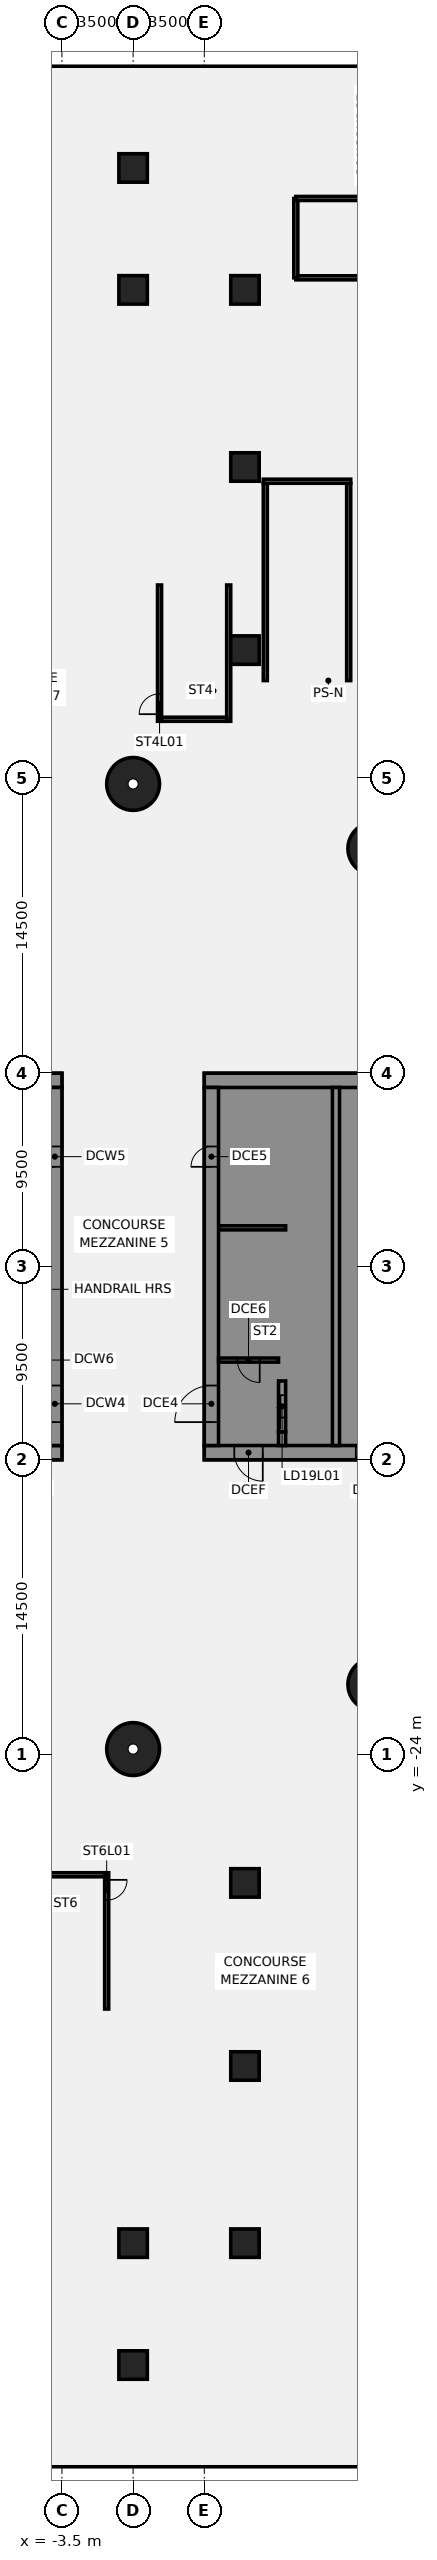
"""IFC4 building model, lengths in metres.
Left out: names, types, materials, properties, quantities, classifications, styles, units other than length and angle.
Written with IfcOpenShell. Run it as: python <this file> out.ifc"""

import sys

from ifc_helpers import new_model, si_unit, direction, frame, frame_2d, origin, origin_2d, place, context, subcontext, project, spatial, polyline, rectangle, circle, outline, extrude, element, fill, save


model = new_model("IFC4")
c1 = context("Model", 3, precision=1e-05, world=origin(), true_north=direction((0.0, 1.0)))
c2 = subcontext(c1, "Body", "Model", "MODEL_VIEW")
j1 = project(units=[si_unit("LENGTHUNIT", "METRE"), si_unit("PLANEANGLEUNIT", "RADIAN")], contexts=[c1])
p1 = place(None, origin())
s1 = spatial("IfcSite", under=j1, at=p1, CompositionType="ELEMENT")
p2 = place(p1, origin())
s2 = spatial("IfcBuilding", under=s1, at=p2, CompositionType="ELEMENT")
p3 = place(p2, frame((0.0, 0.0, 9.0)))
s3 = spatial("IfcBuildingStorey", under=s2, at=p3, CompositionType="ELEMENT", Elevation=9.0)
for number, where, z_axis, x_axis in (
    (1, (11.86, 20.543, -0.5), (0.0, 0.0, 1.0), (1.0, 0.0, 0.0)),
    (2, (0.0, 23.721, -0.5), (0.0, 0.0, 1.0), (1.0, 0.0, 0.0)),
    (3, (0.0, -23.721, -0.5), (0.0, 0.0, 1.0), (1.0, 0.0, 0.0)),
    (4, (11.86, -20.543, -0.5), (0.0, 0.0, 1.0), (1.0, 0.0, 0.0)),
):
    element("IfcColumn", number, at=place(p3, frame(where, z_axis=z_axis, x_axis=x_axis)), inside=s3, PredefinedType="COLUMN", context=c2, shape_type="SweptSolid", body=[
        extrude(circle(Radius=1.3, at=origin_2d()), origin(), (0.0, 0.0, 1.0), 6.0),
    ])
for number, where, z_axis, x_axis in (
    (5, (5.5, 39.3, -0.5), (0.0, 0.0, 1.0), (1.0, 0.0, 0.0)),
    (6, (5.5, 30.3, -0.5), (0.0, 0.0, 1.0), (1.0, 0.0, 0.0)),
    (7, (5.5, 48.008, -0.5), (0.0, 0.0, 1.0), (1.0, 0.0, 0.0)),
    (8, (0.0, 48.008, -0.5), (0.0, 0.0, 1.0), (1.0, 0.0, 0.0)),
    (9, (5.5, -39.3, -0.5), (0.0, 0.0, 1.0), (1.0, 0.0, 0.0)),
    (10, (5.5, -30.3, -0.5), (0.0, 0.0, 1.0), (1.0, 0.0, 0.0)),
    (11, (0.0, -48.008, -0.5), (0.0, 0.0, 1.0), (1.0, 0.0, 0.0)),
    (12, (5.5, -48.008, -0.5), (0.0, 0.0, 1.0), (1.0, 0.0, 0.0)),
    (13, (0.0, -54.0, -0.5), (0.0, 0.0, 1.0), (1.0, 0.0, 0.0)),
    (14, (0.0, 54.0, -0.5), (0.0, 0.0, 1.0), (1.0, 0.0, 0.0)),
):
    element("IfcColumn", number, at=place(p3, frame(where, z_axis=z_axis, x_axis=x_axis)), inside=s3, PredefinedType="COLUMN", context=c2, shape_type="SweptSolid", body=[
        extrude(rectangle(XDim=1.4, YDim=1.4, at=origin_2d()), origin(), (0.0, 0.0, 1.0), 6.0),
    ])
p4 = place(p3, frame((8.0, 48.6, 0.0), z_axis=(0.0, 0.0, 1.0), x_axis=(1.0, 0.0, 0.0)))
e15 = element("IfcWall", 15, at=p4, inside=s3, PredefinedType="PARTITIONING", context=c2, shape_type="SweptSolid", body=[
    extrude(rectangle(XDim=11.5, YDim=0.2, at=frame_2d((5.75, 0.0))), origin(), (0.0, 0.0, 1.0), 5.5),
])
p5 = place(p4, frame((9.78, 0.0, 0.0)))
e16 = element("IfcOpeningElement", 16, at=p5, cuts=e15, PredefinedType="OPENING", context=c2, shape_type="SweptSolid", body=[
    extrude(rectangle(XDim=1.2, YDim=2.1, at=frame_2d((0.6, 1.05))), frame((0.0, 0.11, 0.0), z_axis=(0.0, -1.0, 0.0), x_axis=(1.0, 0.0, 0.0)), (0.0, 0.0, 1.0), 0.22),
])
p6 = place(p3, frame((8.0, 48.6, 0.0), z_axis=(0.0, 0.0, 1.0), x_axis=(0.0, 1.0, 0.0)))
e17 = element("IfcWall", 17, at=p6, inside=s3, PredefinedType="PARTITIONING", context=c2, shape_type="SweptSolid", body=[
    extrude(rectangle(XDim=3.9, YDim=0.2, at=frame_2d((1.95, 0.0))), origin(), (0.0, 0.0, 1.0), 5.5),
])
p7 = place(p3, frame((8.0, 52.5, 0.0), z_axis=(0.0, 0.0, 1.0), x_axis=(1.0, 0.0, 0.0)))
e18 = element("IfcWall", 18, at=p7, inside=s3, PredefinedType="PARTITIONING", context=c2, shape_type="SweptSolid", body=[
    extrude(rectangle(XDim=11.5, YDim=0.2, at=frame_2d((5.75, 0.0))), origin(), (0.0, 0.0, 1.0), 5.5),
])
for number, where, z_axis, x_axis in (
    (19, (10.6, 28.8, 0.0), (0.0, 0.0, 1.0), (0.0, 1.0, 0.0)),
    (20, (6.5, 28.8, 0.0), (0.0, 0.0, 1.0), (0.0, 1.0, 0.0)),
):
    element("IfcWall", number, at=place(p3, frame(where, z_axis=z_axis, x_axis=x_axis)), inside=s3, PredefinedType="SOLIDWALL", context=c2, shape_type="SweptSolid", body=[
        extrude(rectangle(XDim=9.7, YDim=0.2, at=frame_2d((4.85, 0.0))), origin(), (0.0, 0.0, 1.0), 5.5),
    ])
p8 = place(p3, frame((10.7, 38.6, 0.0), z_axis=(0.0, 0.0, 1.0), x_axis=(-1.0, 0.0, 0.0)))
e21 = element("IfcWall", 21, at=p8, inside=s3, PredefinedType="SOLIDWALL", context=c2, shape_type="SweptSolid", body=[
    extrude(rectangle(XDim=4.3, YDim=0.2, at=frame_2d((2.15, 0.0))), origin(), (0.0, 0.0, 1.0), 5.5),
])
p9 = place(p3, frame((-16.5, -9.15, 0.0), z_axis=(0.0, 0.0, 1.0), x_axis=(1.0, 0.0, 0.0)))
e22 = element("IfcWall", 22, at=p9, inside=s3, PredefinedType="SHEAR", context=c2, shape_type="SweptSolid", body=[
    extrude(rectangle(XDim=13.0, YDim=0.7, at=frame_2d((6.5, 0.0))), origin(), (0.0, 0.0, 1.0), 5.5),
])
p10 = place(p9, frame((4.15, 0.0, 0.0)))
e23 = element("IfcOpeningElement", 23, at=p10, cuts=e22, PredefinedType="OPENING", context=c2, shape_type="SweptSolid", body=[
    extrude(rectangle(XDim=1.4, YDim=2.1, at=frame_2d((0.7, 1.05))), frame((0.0, 0.36, 0.0), z_axis=(0.0, -1.0, 0.0), x_axis=(1.0, 0.0, 0.0)), (0.0, 0.0, 1.0), 0.72),
])
p11 = place(p9, frame((10.125, 0.0, 0.0)))
e24 = element("IfcOpeningElement", 24, at=p11, cuts=e22, PredefinedType="OPENING", context=c2, shape_type="SweptSolid", body=[
    extrude(rectangle(XDim=1.4, YDim=2.1, at=frame_2d((0.7, 1.05))), frame((0.0, 0.36, 0.0), z_axis=(0.0, -1.0, 0.0), x_axis=(1.0, 0.0, 0.0)), (0.0, 0.0, 1.0), 0.72),
])
p12 = place(p3, frame((-16.5, 9.15, 0.0), z_axis=(0.0, 0.0, 1.0), x_axis=(1.0, 0.0, 0.0)))
e25 = element("IfcWall", 25, at=p12, inside=s3, PredefinedType="SHEAR", context=c2, shape_type="SweptSolid", body=[
    extrude(rectangle(XDim=13.0, YDim=0.7, at=frame_2d((6.5, 0.0))), origin(), (0.0, 0.0, 1.0), 5.5),
])
p13 = place(p3, frame((-3.85, -8.8, 0.0), z_axis=(0.0, 0.0, 1.0), x_axis=(0.0, 1.0, 0.0)))
e26 = element("IfcWall", 26, at=p13, inside=s3, PredefinedType="SHEAR", context=c2, shape_type="SweptSolid", body=[
    extrude(rectangle(XDim=17.6, YDim=0.7, at=frame_2d((8.8, 0.0))), origin(), (0.0, 0.0, 1.0), 5.5),
])
p14 = place(p13, frame((1.15, 0.0, 0.0)))
e27 = element("IfcOpeningElement", 27, at=p14, cuts=e26, PredefinedType="OPENING", context=c2, shape_type="SweptSolid", body=[
    extrude(rectangle(XDim=1.8, YDim=2.1, at=frame_2d((0.9, 1.05))), frame((0.0, 0.36, 0.0), z_axis=(0.0, -1.0, 0.0), x_axis=(1.0, 0.0, 0.0)), (0.0, 0.0, 1.0), 0.72),
])
p15 = place(p13, frame((13.7, 0.0, 0.0)))
e28 = element("IfcOpeningElement", 28, at=p15, cuts=e26, PredefinedType="OPENING", context=c2, shape_type="SweptSolid", body=[
    extrude(rectangle(XDim=1.0, YDim=2.1, at=frame_2d((0.5, 1.05))), frame((0.0, 0.36, 0.0), z_axis=(0.0, -1.0, 0.0), x_axis=(1.0, 0.0, 0.0)), (0.0, 0.0, 1.0), 0.72),
])
p16 = place(p3, frame((16.5, -9.15, 0.0), z_axis=(0.0, 0.0, 1.0), x_axis=(-1.0, 0.0, 0.0)))
e29 = element("IfcWall", 29, at=p16, inside=s3, PredefinedType="SHEAR", context=c2, shape_type="SweptSolid", body=[
    extrude(rectangle(XDim=13.0, YDim=0.7, at=frame_2d((6.5, 0.0))), origin(), (0.0, 0.0, 1.0), 5.5),
])
p17 = place(p16, frame((4.15, 0.0, 0.0)))
e30 = element("IfcOpeningElement", 30, at=p17, cuts=e29, PredefinedType="OPENING", context=c2, shape_type="SweptSolid", body=[
    extrude(rectangle(XDim=1.4, YDim=2.1, at=frame_2d((0.7, 1.05))), frame((0.0, 0.36, 0.0), z_axis=(0.0, -1.0, 0.0), x_axis=(1.0, 0.0, 0.0)), (0.0, 0.0, 1.0), 0.72),
])
p18 = place(p16, frame((10.125, 0.0, 0.0)))
e31 = element("IfcOpeningElement", 31, at=p18, cuts=e29, PredefinedType="OPENING", context=c2, shape_type="SweptSolid", body=[
    extrude(rectangle(XDim=1.4, YDim=2.1, at=frame_2d((0.7, 1.05))), frame((0.0, 0.36, 0.0), z_axis=(0.0, -1.0, 0.0), x_axis=(1.0, 0.0, 0.0)), (0.0, 0.0, 1.0), 0.72),
])
p19 = place(p3, frame((16.5, 9.15, 0.0), z_axis=(0.0, 0.0, 1.0), x_axis=(-1.0, 0.0, 0.0)))
e32 = element("IfcWall", 32, at=p19, inside=s3, PredefinedType="SHEAR", context=c2, shape_type="SweptSolid", body=[
    extrude(rectangle(XDim=13.0, YDim=0.7, at=frame_2d((6.5, 0.0))), origin(), (0.0, 0.0, 1.0), 5.5),
])
p20 = place(p3, origin())
e33 = element("IfcWall", 33, at=p20, inside=s3, PredefinedType="SHEAR", context=c2, shape_type="SweptSolid", body=[
    extrude(outline(polyline([(9.8, -5.375), (7.5, -5.375), (7.5, -2.875), (9.8, -2.875), (9.8, -2.625), (7.5, -2.625), (7.5, -0.125), (9.8, -0.125), (9.8, 0.125), (7.5, 0.125), (7.5, 2.625), (9.8, 2.625), (9.8, 2.875), (7.5, 2.875), (7.5, 5.375), (9.8, 5.375), (9.8, 5.625), (7.5, 5.625), (7.5, 8.125), (9.8, 8.125), (9.8, 8.8), (7.5, 8.8), (7.15, 8.8), (7.15, -5.625), (7.5, -5.625), (9.8, -5.625), (9.8, -5.375)])), origin(), (0.0, 0.0, 1.0), 5.5),
])
p21 = place(p3, origin())
e34 = element("IfcWall", 34, at=p21, inside=s3, PredefinedType="SHEAR", context=c2, shape_type="SweptSolid", body=[
    extrude(outline(polyline([(7.5, -8.125), (7.5, -8.8), (9.8, -8.8), (9.8, -8.125), (9.8, -5.625), (9.55, -5.625), (9.55, -8.125), (7.5, -8.125)])), origin(), (0.0, 0.0, 1.0), 5.5),
])
p22 = place(p3, frame((7.325, -8.8, 0.0), z_axis=(0.0, 0.0, 1.0), x_axis=(0.0, 1.0, 0.0)))
e35 = element("IfcWall", 35, at=p22, inside=s3, PredefinedType="SHEAR", context=c2, shape_type="SweptSolid", body=[
    extrude(rectangle(XDim=0.675, YDim=0.35, at=frame_2d((0.337, 0.0))), origin(), (0.0, 0.0, 1.0), 5.5),
])
p23 = place(p3, frame((7.5, 1.9, 0.0), z_axis=(0.0, 0.0, 1.0), x_axis=(-1.0, 0.0, 0.0)))
e36 = element("IfcWall", 36, at=p23, inside=s3, PredefinedType="SHEAR", context=c2, shape_type="SweptSolid", body=[
    extrude(rectangle(XDim=3.3, YDim=0.2, at=frame_2d((1.65, 0.0))), origin(), (0.0, 0.0, 1.0), 5.5),
])
p24 = place(p3, frame((9.975, -8.8, 0.0), z_axis=(0.0, 0.0, 1.0), x_axis=(0.0, 1.0, 0.0)))
e37 = element("IfcWall", 37, at=p24, inside=s3, PredefinedType="SHEAR", context=c2, shape_type="SweptSolid", body=[
    extrude(rectangle(XDim=17.6, YDim=0.35, at=frame_2d((8.8, 0.0))), origin(), (0.0, 0.0, 1.0), 5.5),
])
p25 = place(p3, frame((7.325, -8.125, 0.0), z_axis=(0.0, 0.0, 1.0), x_axis=(0.0, 1.0, 0.0)))
e38 = element("IfcWall", 38, at=p25, inside=s3, PredefinedType="SHEAR", context=c2, shape_type="SweptSolid", body=[
    extrude(rectangle(XDim=2.5, YDim=0.35, at=frame_2d((1.25, 0.0))), origin(), (0.0, 0.0, 1.0), 5.5),
])
p26 = place(p25, frame((0.7, 0.0, 0.0)))
e39 = element("IfcOpeningElement", 39, at=p26, cuts=e38, PredefinedType="OPENING", context=c2, shape_type="SweptSolid", body=[
    extrude(rectangle(XDim=1.1, YDim=2.1, at=frame_2d((0.55, 1.05))), frame((0.0, 0.185, 0.0), z_axis=(0.0, -1.0, 0.0), x_axis=(1.0, 0.0, 0.0)), (0.0, 0.0, 1.0), 0.37),
])
p27 = place(p3, frame((3.85, -8.8, 0.0), z_axis=(0.0, 0.0, 1.0), x_axis=(0.0, 1.0, 0.0)))
e40 = element("IfcWall", 40, at=p27, inside=s3, PredefinedType="SHEAR", context=c2, shape_type="SweptSolid", body=[
    extrude(rectangle(XDim=17.6, YDim=0.7, at=frame_2d((8.8, 0.0))), origin(), (0.0, 0.0, 1.0), 5.5),
])
p28 = place(p27, frame((1.15, 0.0, 0.0)))
e41 = element("IfcOpeningElement", 41, at=p28, cuts=e40, PredefinedType="OPENING", context=c2, shape_type="SweptSolid", body=[
    extrude(rectangle(XDim=1.8, YDim=2.1, at=frame_2d((0.9, 1.05))), frame((0.0, 0.36, 0.0), z_axis=(0.0, -1.0, 0.0), x_axis=(1.0, 0.0, 0.0)), (0.0, 0.0, 1.0), 0.72),
])
p29 = place(p27, frame((13.7, 0.0, 0.0)))
e42 = element("IfcOpeningElement", 42, at=p29, cuts=e40, PredefinedType="OPENING", context=c2, shape_type="SweptSolid", body=[
    extrude(rectangle(XDim=1.0, YDim=2.1, at=frame_2d((0.5, 1.05))), frame((0.0, 0.36, 0.0), z_axis=(0.0, -1.0, 0.0), x_axis=(1.0, 0.0, 0.0)), (0.0, 0.0, 1.0), 0.72),
])
p30 = place(p3, frame((7.15, -4.6, 0.0), z_axis=(0.0, 0.0, 1.0), x_axis=(-1.0, 0.0, 0.0)))
e43 = element("IfcWall", 43, at=p30, inside=s3, PredefinedType="SHEAR", context=c2, shape_type="SweptSolid", body=[
    extrude(rectangle(XDim=2.95, YDim=0.2, at=frame_2d((1.475, 0.0))), origin(), (0.0, 0.0, 1.0), 5.5),
])
p31 = place(p30, frame((0.925, 0.0, 0.0)))
e44 = element("IfcOpeningElement", 44, at=p31, cuts=e43, PredefinedType="OPENING", context=c2, shape_type="SweptSolid", body=[
    extrude(rectangle(XDim=1.1, YDim=2.1, at=frame_2d((0.55, 1.05))), frame((0.0, 0.11, 0.0), z_axis=(0.0, -1.0, 0.0), x_axis=(1.0, 0.0, 0.0)), (0.0, 0.0, 1.0), 0.22),
])
p32 = place(p3, frame((1.3, 26.8, 0.0), z_axis=(0.0, 0.0, 1.0), x_axis=(0.0, 1.0, 0.0)))
e45 = element("IfcWall", 45, at=p32, inside=s3, PredefinedType="SHEAR", context=c2, shape_type="SweptSolid", body=[
    extrude(rectangle(XDim=6.7, YDim=0.2, at=frame_2d((3.35, 0.0))), origin(), (0.0, 0.0, 1.0), 5.5),
])
p33 = place(p32, frame((0.35, 0.0, 0.0)))
e46 = element("IfcOpeningElement", 46, at=p33, cuts=e45, PredefinedType="OPENING", context=c2, shape_type="SweptSolid", body=[
    extrude(rectangle(XDim=1.0, YDim=2.1, at=frame_2d((0.5, 1.05))), frame((0.0, 0.11, 0.0), z_axis=(0.0, -1.0, 0.0), x_axis=(1.0, 0.0, 0.0)), (0.0, 0.0, 1.0), 0.22),
])
p34 = place(p3, frame((4.7, 26.8, 0.0), z_axis=(0.0, 0.0, 1.0), x_axis=(0.0, 1.0, 0.0)))
e47 = element("IfcWall", 47, at=p34, inside=s3, PredefinedType="SHEAR", context=c2, shape_type="SweptSolid", body=[
    extrude(rectangle(XDim=6.7, YDim=0.2, at=frame_2d((3.35, 0.0))), origin(), (0.0, 0.0, 1.0), 5.5),
])
p35 = place(p3, frame((4.6, 26.9, 0.0), z_axis=(0.0, 0.0, 1.0), x_axis=(-1.0, 0.0, 0.0)))
e48 = element("IfcWall", 48, at=p35, inside=s3, PredefinedType="SHEAR", context=c2, shape_type="SweptSolid", body=[
    extrude(rectangle(XDim=3.2, YDim=0.2, at=frame_2d((1.6, 0.0))), origin(), (0.0, 0.0, 1.0), 5.5),
])
p36 = place(p3, origin())
e49 = element("IfcWall", 49, at=p36, inside=s3, PredefinedType="SHEAR", context=c2, shape_type="SweptSolid", body=[
    extrude(outline(polyline([(4.6, 33.3), (4.6, 33.5), (1.4, 33.5), (1.4, 33.3), (4.6, 33.3)])), origin(), (0.0, 0.0, 1.0), 5.5),
])
p37 = place(p3, frame((-1.3, -29.8, 0.0), z_axis=(0.0, 0.0, 1.0), x_axis=(0.0, -1.0, 0.0)))
e50 = element("IfcWall", 50, at=p37, inside=s3, PredefinedType="SHEAR", context=c2, shape_type="SweptSolid", body=[
    extrude(rectangle(XDim=6.7, YDim=0.2, at=frame_2d((3.35, 0.0))), origin(), (0.0, 0.0, 1.0), 5.5),
])
p38 = place(p37, frame((0.35, 0.0, 0.0)))
e51 = element("IfcOpeningElement", 51, at=p38, cuts=e50, PredefinedType="OPENING", context=c2, shape_type="SweptSolid", body=[
    extrude(rectangle(XDim=1.0, YDim=2.1, at=frame_2d((0.5, 1.05))), frame((0.0, 0.11, 0.0), z_axis=(0.0, -1.0, 0.0), x_axis=(1.0, 0.0, 0.0)), (0.0, 0.0, 1.0), 0.22),
])
p39 = place(p3, frame((-4.6, -29.9, 0.0), z_axis=(0.0, 0.0, 1.0), x_axis=(1.0, 0.0, 0.0)))
e52 = element("IfcWall", 52, at=p39, inside=s3, PredefinedType="SHEAR", context=c2, shape_type="SweptSolid", body=[
    extrude(rectangle(XDim=3.2, YDim=0.2, at=frame_2d((1.6, 0.0))), origin(), (0.0, 0.0, 1.0), 5.5),
])
p40 = place(p3, origin())
e53 = element("IfcWall", 53, at=p40, inside=s3, PredefinedType="SHEAR", context=c2, shape_type="SweptSolid", body=[
    extrude(outline(polyline([(-4.6, -36.3), (-4.6, -36.5), (-1.4, -36.5), (-1.4, -36.3), (-4.6, -36.3)])), origin(), (0.0, 0.0, 1.0), 5.5),
])
p41 = place(p14, origin())
e54 = element("IfcDoor", 54, at=p41, inside=s3, OperationType="SINGLE_SWING_LEFT", PredefinedType="DOOR", context=c2, shape_type="SweptSolid", body=[
    extrude(rectangle(XDim=1.8, YDim=2.1, at=frame_2d((0.9, 1.05))), frame((0.0, 0.025, 0.0), z_axis=(0.0, -1.0, 0.0), x_axis=(1.0, 0.0, 0.0)), (0.0, 0.0, 1.0), 0.05),
])
fill(e27, e54)
p42 = place(p15, origin())
e55 = element("IfcDoor", 55, at=p42, inside=s3, OperationType="SINGLE_SWING_LEFT", PredefinedType="DOOR", context=c2, shape_type="SweptSolid", body=[
    extrude(rectangle(XDim=1.0, YDim=2.1, at=frame_2d((0.5, 1.05))), frame((0.0, 0.025, 0.0), z_axis=(0.0, -1.0, 0.0), x_axis=(1.0, 0.0, 0.0)), (0.0, 0.0, 1.0), 0.05),
])
fill(e28, e55)
p43 = place(p17, origin())
e56 = element("IfcDoor", 56, at=p43, inside=s3, OperationType="SINGLE_SWING_LEFT", PredefinedType="DOOR", context=c2, shape_type="SweptSolid", body=[
    extrude(rectangle(XDim=1.4, YDim=2.1, at=frame_2d((0.7, 1.05))), frame((0.0, 0.025, 0.0), z_axis=(0.0, -1.0, 0.0), x_axis=(1.0, 0.0, 0.0)), (0.0, 0.0, 1.0), 0.05),
])
fill(e30, e56)
p44 = place(p18, origin())
e57 = element("IfcDoor", 57, at=p44, inside=s3, OperationType="SINGLE_SWING_LEFT", PredefinedType="DOOR", context=c2, shape_type="SweptSolid", body=[
    extrude(rectangle(XDim=1.4, YDim=2.1, at=frame_2d((0.7, 1.05))), frame((0.0, 0.025, 0.0), z_axis=(0.0, -1.0, 0.0), x_axis=(1.0, 0.0, 0.0)), (0.0, 0.0, 1.0), 0.05),
])
fill(e31, e57)
p45 = place(p28, origin())
e58 = element("IfcDoor", 58, at=p45, inside=s3, OperationType="SINGLE_SWING_LEFT", PredefinedType="DOOR", context=c2, shape_type="SweptSolid", body=[
    extrude(rectangle(XDim=1.8, YDim=2.1, at=frame_2d((0.9, 1.05))), frame((0.0, 0.025, 0.0), z_axis=(0.0, -1.0, 0.0), x_axis=(1.0, 0.0, 0.0)), (0.0, 0.0, 1.0), 0.05),
])
fill(e41, e58)
p46 = place(p29, origin())
e59 = element("IfcDoor", 59, at=p46, inside=s3, OperationType="SINGLE_SWING_LEFT", PredefinedType="DOOR", context=c2, shape_type="SweptSolid", body=[
    extrude(rectangle(XDim=1.0, YDim=2.1, at=frame_2d((0.5, 1.05))), frame((0.0, 0.025, 0.0), z_axis=(0.0, -1.0, 0.0), x_axis=(1.0, 0.0, 0.0)), (0.0, 0.0, 1.0), 0.05),
])
fill(e42, e59)
p47 = place(p31, origin())
e60 = element("IfcDoor", 60, at=p47, inside=s3, OperationType="SINGLE_SWING_LEFT", PredefinedType="DOOR", context=c2, shape_type="SweptSolid", body=[
    extrude(rectangle(XDim=1.1, YDim=2.1, at=frame_2d((0.55, 1.05))), frame((0.0, 0.025, 0.0), z_axis=(0.0, -1.0, 0.0), x_axis=(1.0, 0.0, 0.0)), (0.0, 0.0, 1.0), 0.05),
])
fill(e44, e60)
p48 = place(p26, origin())
e61 = element("IfcDoor", 61, at=p48, inside=s3, OperationType="SLIDING_TO_LEFT", PredefinedType="DOOR", context=c2, shape_type="SweptSolid", body=[
    extrude(rectangle(XDim=1.1, YDim=2.1, at=frame_2d((0.55, 1.05))), frame((0.0, 0.025, 0.0), z_axis=(0.0, -1.0, 0.0), x_axis=(1.0, 0.0, 0.0)), (0.0, 0.0, 1.0), 0.05),
])
fill(e39, e61)
p49 = place(p33, origin())
e62 = element("IfcDoor", 62, at=p49, inside=s3, OperationType="SINGLE_SWING_LEFT", PredefinedType="DOOR", context=c2, shape_type="SweptSolid", body=[
    extrude(rectangle(XDim=1.0, YDim=2.1, at=frame_2d((0.5, 1.05))), frame((0.0, 0.025, 0.0), z_axis=(0.0, -1.0, 0.0), x_axis=(1.0, 0.0, 0.0)), (0.0, 0.0, 1.0), 0.05),
])
fill(e46, e62)
p50 = place(p38, origin())
e63 = element("IfcDoor", 63, at=p50, inside=s3, OperationType="SINGLE_SWING_LEFT", PredefinedType="DOOR", context=c2, shape_type="SweptSolid", body=[
    extrude(rectangle(XDim=1.0, YDim=2.1, at=frame_2d((0.5, 1.05))), frame((0.0, 0.025, 0.0), z_axis=(0.0, -1.0, 0.0), x_axis=(1.0, 0.0, 0.0)), (0.0, 0.0, 1.0), 0.05),
])
fill(e51, e63)
save(model, sys.argv[1])
